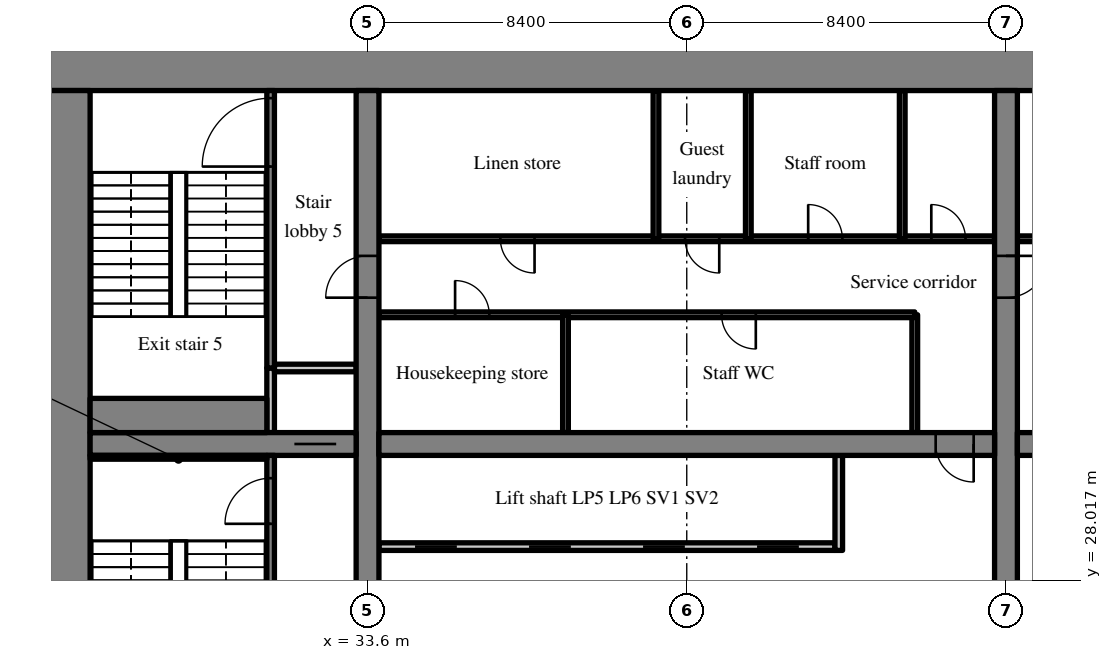
"""IFC4 building model, lengths in metres.
Left out: names, types, materials, properties, quantities, classifications, styles, units other than length and angle.
Written with IfcOpenShell. Run it as: python <this file> out.ifc"""

import sys

from ifc_helpers import new_model, si_unit, direction, frame, frame_2d, origin, place, context, subcontext, project, spatial, rectangle, extrude, source, transform, mapped, element, fill, save


model = new_model("IFC4")
c1 = context("Model", 3, precision=1e-05, world=origin(), true_north=direction((0.0, 1.0)))
c2 = subcontext(c1, "Body", "Model", "MODEL_VIEW")
j1 = project(units=[si_unit("LENGTHUNIT", "METRE"), si_unit("PLANEANGLEUNIT", "RADIAN")], contexts=[c1])
p1 = place(None, origin())
s1 = spatial("IfcSite", under=j1, at=p1, CompositionType="ELEMENT")
p2 = place(p1, origin())
s2 = spatial("IfcBuilding", under=s1, at=p2, CompositionType="ELEMENT")
p3 = place(p2, frame((0.0, 0.0, 6.0)))
s3 = spatial("IfcBuildingStorey", under=s2, at=p3, CompositionType="ELEMENT", Elevation=6.0)
m1 = source(origin(), c2, "Body", "SweptSolid", [
    extrude(rectangle(XDim=50.4, YDim=1.1, at=frame_2d((25.2, 0.0))), origin(), (0.0, 0.0, 1.0), 5.12),
])
p4 = place(p3, frame((25.2, 41.45, 0.0), z_axis=(0.0, 0.0, 1.0), x_axis=(1.0, 0.0, 0.0)))
e1 = element("IfcWall", 1, at=p4, inside=s3, PredefinedType="SHEAR", context=c2, shape_type="MappedRepresentation", body=[
    mapped(m1, transform((0.0, 0.0, 0.0), scale=1.0)),
])
m2 = source(origin(), c2, "Body", "SweptSolid", [
    extrude(rectangle(XDim=17.8, YDim=1.1, at=frame_2d((8.9, 0.0))), origin(), (0.0, 0.0, 1.0), 5.12),
])
p5 = place(p3, frame((25.75, 23.1, 0.0), z_axis=(0.0, 0.0, 1.0), x_axis=(0.0, 1.0, 0.0)))
e2 = element("IfcWall", 2, at=p5, inside=s3, PredefinedType="SHEAR", context=c2, shape_type="MappedRepresentation", body=[
    mapped(m2, transform((0.0, 0.0, 0.0), scale=1.0)),
])
m3 = source(origin(), c2, "Body", "SweptSolid", [
    extrude(rectangle(XDim=17.8, YDim=0.6, at=frame_2d((8.9, 0.0))), origin(), (0.0, 0.0, 1.0), 5.12),
])
p6 = place(p3, frame((33.6, 23.1, 0.0), z_axis=(0.0, 0.0, 1.0), x_axis=(0.0, 1.0, 0.0)))
e3 = element("IfcWall", 3, at=p6, inside=s3, PredefinedType="SHEAR", context=c2, shape_type="MappedRepresentation", body=[
    mapped(m3, transform((0.0, 0.0, 0.0), scale=1.0)),
])
m4 = source(origin(), c2, "Body", "SweptSolid", [
    extrude(rectangle(XDim=1.1, YDim=2.1, at=frame_2d((0.55, 1.05))), frame((0.0, 0.31, 0.0), z_axis=(0.0, -1.0, 0.0), x_axis=(1.0, 0.0, 0.0)), (0.0, 0.0, 1.0), 0.62),
])
p7 = place(p6, frame((12.35, 0.0, 0.0)))
e4 = element("IfcOpeningElement", 4, at=p7, cuts=e3, PredefinedType="OPENING", context=c2, shape_type="MappedRepresentation", body=[
    mapped(m4, transform((0.0, 0.0, 0.0), scale=1.0)),
])
p8 = place(p3, frame((50.4, 23.1, 0.0), z_axis=(0.0, 0.0, 1.0), x_axis=(0.0, 1.0, 0.0)))
e5 = element("IfcWall", 5, at=p8, inside=s3, PredefinedType="SHEAR", context=c2, shape_type="MappedRepresentation", body=[
    mapped(m3, transform((0.0, 0.0, 0.0), scale=1.0)),
])
p9 = place(p8, frame((12.35, 0.0, 0.0)))
e6 = element("IfcOpeningElement", 6, at=p9, cuts=e5, PredefinedType="OPENING", context=c2, shape_type="MappedRepresentation", body=[
    mapped(m4, transform((0.0, 0.0, 0.0), scale=1.0)),
])
m5 = source(origin(), c2, "Body", "SweptSolid", [
    extrude(rectangle(XDim=7.0, YDim=0.6, at=frame_2d((3.5, 0.0))), origin(), (0.0, 0.0, 1.0), 5.12),
])
p10 = place(p3, frame((26.3, 31.6, 0.0), z_axis=(0.0, 0.0, 1.0), x_axis=(1.0, 0.0, 0.0)))
e7 = element("IfcWall", 7, at=p10, inside=s3, PredefinedType="SHEAR", context=c2, shape_type="MappedRepresentation", body=[
    mapped(m5, transform((0.0, 0.0, 0.0), scale=1.0)),
])
p11 = place(p10, frame((5.375, 0.0, 0.0)))
e8 = element("IfcOpeningElement", 8, at=p11, cuts=e7, PredefinedType="OPENING", context=c2, shape_type="MappedRepresentation", body=[
    mapped(m4, transform((0.0, 0.0, 0.0), scale=1.0)),
])
m6 = source(origin(), c2, "Body", "SweptSolid", [
    extrude(rectangle(XDim=16.2, YDim=0.6, at=frame_2d((8.1, 0.0))), origin(), (0.0, 0.0, 1.0), 5.12),
])
p12 = place(p3, frame((33.9, 31.6, 0.0), z_axis=(0.0, 0.0, 1.0), x_axis=(1.0, 0.0, 0.0)))
e9 = element("IfcWall", 9, at=p12, inside=s3, PredefinedType="SHEAR", context=c2, shape_type="MappedRepresentation", body=[
    mapped(m6, transform((0.0, 0.0, 0.0), scale=1.0)),
])
m7 = source(origin(), c2, "Body", "SweptSolid", [
    extrude(rectangle(XDim=1.0, YDim=2.1, at=frame_2d((0.5, 1.05))), frame((0.0, 0.31, 0.0), z_axis=(0.0, -1.0, 0.0), x_axis=(1.0, 0.0, 0.0)), (0.0, 0.0, 1.0), 0.62),
])
p13 = place(p12, frame((14.65, 0.0, 0.0)))
e10 = element("IfcOpeningElement", 10, at=p13, cuts=e9, PredefinedType="OPENING", context=c2, shape_type="MappedRepresentation", body=[
    mapped(m7, transform((0.0, 0.0, 0.0), scale=1.0)),
])
m8 = source(origin(), c2, "Body", "SweptSolid", [
    extrude(rectangle(XDim=16.2, YDim=0.6, at=frame_2d((8.1, 0.0))), origin(), (0.0, 0.0, 1.0), 5.12),
])
p14 = place(p3, frame((50.7, 31.6, 0.0), z_axis=(0.0, 0.0, 1.0), x_axis=(1.0, 0.0, 0.0)))
e11 = element("IfcWall", 11, at=p14, inside=s3, PredefinedType="SHEAR", context=c2, shape_type="MappedRepresentation", body=[
    mapped(m8, transform((0.0, 0.0, 0.0), scale=1.0)),
])
p15 = place(p14, frame((0.55, 0.0, 0.0)))
e12 = element("IfcOpeningElement", 12, at=p15, cuts=e11, PredefinedType="OPENING", context=c2, shape_type="MappedRepresentation", body=[
    mapped(m7, transform((0.0, 0.0, 0.0), scale=1.0)),
])
m9 = source(origin(), c2, "Body", "SweptSolid", [
    extrude(rectangle(XDim=12.0, YDim=0.2, at=frame_2d((6.0, 0.0))), origin(), (0.0, 0.0, 1.0), 5.12),
])
p16 = place(p3, frame((33.9, 28.9, 0.0), z_axis=(0.0, 0.0, 1.0), x_axis=(1.0, 0.0, 0.0)))
e13 = element("IfcWall", 13, at=p16, inside=s3, PredefinedType="SOLIDWALL", context=c2, shape_type="MappedRepresentation", body=[
    mapped(m9, transform((0.0, 0.0, 0.0), scale=1.0)),
])
m10 = source(origin(), c2, "Body", "SweptSolid", [
    extrude(rectangle(XDim=1.1, YDim=2.1, at=frame_2d((0.55, 1.05))), frame((0.0, 0.11, 0.0), z_axis=(0.0, -1.0, 0.0), x_axis=(1.0, 0.0, 0.0)), (0.0, 0.0, 1.0), 0.22),
])
p17 = place(p16, frame((0.95, 0.0, 0.0)))
e14 = element("IfcOpeningElement", 14, at=p17, cuts=e13, PredefinedType="OPENING", context=c2, shape_type="MappedRepresentation", body=[
    mapped(m10, transform((0.0, 0.0, 0.0), scale=1.0)),
])
p18 = place(p16, frame((3.95, 0.0, 0.0)))
e15 = element("IfcOpeningElement", 15, at=p18, cuts=e13, PredefinedType="OPENING", context=c2, shape_type="MappedRepresentation", body=[
    mapped(m10, transform((0.0, 0.0, 0.0), scale=1.0)),
])
p19 = place(p16, frame((6.95, 0.0, 0.0)))
e16 = element("IfcOpeningElement", 16, at=p19, cuts=e13, PredefinedType="OPENING", context=c2, shape_type="MappedRepresentation", body=[
    mapped(m10, transform((0.0, 0.0, 0.0), scale=1.0)),
])
p20 = place(p16, frame((9.95, 0.0, 0.0)))
e17 = element("IfcOpeningElement", 17, at=p20, cuts=e13, PredefinedType="OPENING", context=c2, shape_type="MappedRepresentation", body=[
    mapped(m10, transform((0.0, 0.0, 0.0), scale=1.0)),
])
m11 = source(origin(), c2, "Body", "SweptSolid", [
    extrude(rectangle(XDim=2.5, YDim=0.2, at=frame_2d((1.25, 0.0))), origin(), (0.0, 0.0, 1.0), 5.12),
])
p21 = place(p3, frame((46.0, 28.8, 0.0), z_axis=(0.0, 0.0, 1.0), x_axis=(0.0, 1.0, 0.0)))
e18 = element("IfcWall", 18, at=p21, inside=s3, PredefinedType="SOLIDWALL", context=c2, shape_type="MappedRepresentation", body=[
    mapped(m11, transform((0.0, 0.0, 0.0), scale=1.0)),
])
m12 = source(origin(), c2, "Body", "SweptSolid", [
    extrude(rectangle(XDim=3.1, YDim=0.15, at=frame_2d((1.55, 0.0))), origin(), (0.0, 0.0, 1.0), 5.12),
])
p22 = place(p3, frame((48.0, 31.9, 0.0), z_axis=(0.0, 0.0, 1.0), x_axis=(0.0, 1.0, 0.0)))
e19 = element("IfcWall", 19, at=p22, inside=s3, PredefinedType="PARTITIONING", context=c2, shape_type="MappedRepresentation", body=[
    mapped(m12, transform((0.0, 0.0, 0.0), scale=1.0)),
])
m13 = source(origin(), c2, "Body", "SweptSolid", [
    extrude(rectangle(XDim=14.1, YDim=0.15, at=frame_2d((7.05, 0.0))), origin(), (0.0, 0.0, 1.0), 5.12),
])
p23 = place(p3, frame((33.9, 35.0, 0.0), z_axis=(0.0, 0.0, 1.0), x_axis=(1.0, 0.0, 0.0)))
e20 = element("IfcWall", 20, at=p23, inside=s3, PredefinedType="PARTITIONING", context=c2, shape_type="MappedRepresentation", body=[
    mapped(m13, transform((0.0, 0.0, 0.0), scale=1.0)),
])
m14 = source(origin(), c2, "Body", "SweptSolid", [
    extrude(rectangle(XDim=0.9, YDim=2.1, at=frame_2d((0.45, 1.05))), frame((0.0, 0.085, 0.0), z_axis=(0.0, -1.0, 0.0), x_axis=(1.0, 0.0, 0.0)), (0.0, 0.0, 1.0), 0.17),
])
p24 = place(p23, frame((2.004, 0.0, 0.0)))
e21 = element("IfcOpeningElement", 21, at=p24, cuts=e20, PredefinedType="OPENING", context=c2, shape_type="MappedRepresentation", body=[
    mapped(m14, transform((0.0, 0.0, 0.0), scale=1.0)),
])
p25 = place(p23, frame((9.017, 0.0, 0.0)))
e22 = element("IfcOpeningElement", 22, at=p25, cuts=e20, PredefinedType="OPENING", context=c2, shape_type="MappedRepresentation", body=[
    mapped(m14, transform((0.0, 0.0, 0.0), scale=1.0)),
])
m15 = source(origin(), c2, "Body", "SweptSolid", [
    extrude(rectangle(XDim=16.2, YDim=0.15, at=frame_2d((8.1, 0.0))), origin(), (0.0, 0.0, 1.0), 5.12),
])
p26 = place(p3, frame((33.9, 37.0, 0.0), z_axis=(0.0, 0.0, 1.0), x_axis=(1.0, 0.0, 0.0)))
e23 = element("IfcWall", 23, at=p26, inside=s3, PredefinedType="PARTITIONING", context=c2, shape_type="MappedRepresentation", body=[
    mapped(m15, transform((0.0, 0.0, 0.0), scale=1.0)),
])
p27 = place(p26, frame((3.195, 0.0, 0.0)))
e24 = element("IfcOpeningElement", 24, at=p27, cuts=e23, PredefinedType="OPENING", context=c2, shape_type="MappedRepresentation", body=[
    mapped(m14, transform((0.0, 0.0, 0.0), scale=1.0)),
])
p28 = place(p26, frame((8.055, 0.0, 0.0)))
e25 = element("IfcOpeningElement", 25, at=p28, cuts=e23, PredefinedType="OPENING", context=c2, shape_type="MappedRepresentation", body=[
    mapped(m14, transform((0.0, 0.0, 0.0), scale=1.0)),
])
p29 = place(p26, frame((11.295, 0.0, 0.0)))
e26 = element("IfcOpeningElement", 26, at=p29, cuts=e23, PredefinedType="OPENING", context=c2, shape_type="MappedRepresentation", body=[
    mapped(m14, transform((0.0, 0.0, 0.0), scale=1.0)),
])
p30 = place(p26, frame((14.535, 0.0, 0.0)))
e27 = element("IfcOpeningElement", 27, at=p30, cuts=e23, PredefinedType="OPENING", context=c2, shape_type="MappedRepresentation", body=[
    mapped(m14, transform((0.0, 0.0, 0.0), scale=1.0)),
])
p31 = place(p3, frame((38.809, 31.9, 0.0), z_axis=(0.0, 0.0, 1.0), x_axis=(0.0, 1.0, 0.0)))
e28 = element("IfcWall", 28, at=p31, inside=s3, PredefinedType="PARTITIONING", context=c2, shape_type="MappedRepresentation", body=[
    mapped(m12, transform((0.0, 0.0, 0.0), scale=1.0)),
])
m16 = source(origin(), c2, "Body", "SweptSolid", [
    extrude(rectangle(XDim=3.9, YDim=0.15, at=frame_2d((1.95, 0.0))), origin(), (0.0, 0.0, 1.0), 5.12),
])
for number, where, z_axis, x_axis in (
    (29, (41.19, 37.0, 0.0), (0.0, 0.0, 1.0), (0.0, 1.0, 0.0)),
    (30, (43.62, 37.0, 0.0), (0.0, 0.0, 1.0), (0.0, 1.0, 0.0)),
    (31, (47.67, 37.0, 0.0), (0.0, 0.0, 1.0), (0.0, 1.0, 0.0)),
):
    element("IfcWall", number, at=place(p3, frame(where, z_axis=z_axis, x_axis=x_axis)), inside=s3, PredefinedType="PARTITIONING", context=c2, shape_type="MappedRepresentation", body=[
        mapped(m16, transform((0.0, 0.0, 0.0), scale=1.0)),
    ])
m17 = source(origin(), c2, "Body", "SweptSolid", [
    extrude(rectangle(XDim=16.2, YDim=0.15, at=frame_2d((8.1, 0.0))), origin(), (0.0, 0.0, 1.0), 5.12),
])
p32 = place(p3, frame((66.9, 37.0, 0.0), z_axis=(0.0, 0.0, 1.0), x_axis=(-1.0, 0.0, 0.0)))
e32 = element("IfcWall", 32, at=p32, inside=s3, PredefinedType="PARTITIONING", context=c2, shape_type="MappedRepresentation", body=[
    mapped(m17, transform((0.0, 0.0, 0.0), scale=1.0)),
])
p33 = place(p32, frame((0.765, 0.0, 0.0)))
e33 = element("IfcOpeningElement", 33, at=p33, cuts=e32, PredefinedType="OPENING", context=c2, shape_type="MappedRepresentation", body=[
    mapped(m14, transform((0.0, 0.0, 0.0), scale=1.0)),
])
p34 = place(p32, frame((3.6, 0.0, 0.0)))
e34 = element("IfcOpeningElement", 34, at=p34, cuts=e32, PredefinedType="OPENING", context=c2, shape_type="MappedRepresentation", body=[
    mapped(m14, transform((0.0, 0.0, 0.0), scale=1.0)),
])
p35 = place(p32, frame((9.27, 0.0, 0.0)))
e35 = element("IfcOpeningElement", 35, at=p35, cuts=e32, PredefinedType="OPENING", context=c2, shape_type="MappedRepresentation", body=[
    mapped(m14, transform((0.0, 0.0, 0.0), scale=1.0)),
])
p36 = place(p32, frame((14.535, 0.0, 0.0)))
e36 = element("IfcOpeningElement", 36, at=p36, cuts=e32, PredefinedType="OPENING", context=c2, shape_type="MappedRepresentation", body=[
    mapped(m14, transform((0.0, 0.0, 0.0), scale=1.0)),
])
m18 = source(origin(), c2, "Body", "SweptSolid", [
    extrude(rectangle(XDim=8.2, YDim=0.2, at=frame_2d((4.1, 0.0))), origin(), (0.0, 0.0, 1.0), 5.12),
])
p37 = place(p3, frame((31.05, 23.1, 0.0), z_axis=(0.0, 0.0, 1.0), x_axis=(0.0, 1.0, 0.0)))
e37 = element("IfcWall", 37, at=p37, inside=s3, PredefinedType="SOLIDWALL", context=c2, shape_type="MappedRepresentation", body=[
    mapped(m18, transform((0.0, 0.0, 0.0), scale=1.0)),
])
m19 = source(origin(), c2, "Body", "SweptSolid", [
    extrude(rectangle(XDim=1.2, YDim=2.1, at=frame_2d((0.6, 1.05))), frame((0.0, 0.11, 0.0), z_axis=(0.0, -1.0, 0.0), x_axis=(1.0, 0.0, 0.0)), (0.0, 0.0, 1.0), 0.22),
])
p38 = place(p37, frame((6.4, 0.0, 0.0)))
e38 = element("IfcOpeningElement", 38, at=p38, cuts=e37, PredefinedType="OPENING", context=c2, shape_type="MappedRepresentation", body=[
    mapped(m19, transform((0.0, 0.0, 0.0), scale=1.0)),
])
m20 = source(origin(), c2, "Body", "SweptSolid", [
    extrude(rectangle(XDim=1.7, YDim=0.2, at=frame_2d((0.85, 0.0))), origin(), (0.0, 0.0, 1.0), 5.12),
])
p39 = place(p3, frame((31.05, 31.9, 0.0), z_axis=(0.0, 0.0, 1.0), x_axis=(0.0, 1.0, 0.0)))
e39 = element("IfcWall", 39, at=p39, inside=s3, PredefinedType="SOLIDWALL", context=c2, shape_type="MappedRepresentation", body=[
    mapped(m20, transform((0.0, 0.0, 0.0), scale=1.0)),
])
m21 = source(origin(), c2, "Body", "SweptSolid", [
    extrude(rectangle(XDim=2.15, YDim=0.2, at=frame_2d((1.075, 0.0))), origin(), (0.0, 0.0, 1.0), 5.12),
])
p40 = place(p3, frame((31.15, 33.6, 0.0), z_axis=(0.0, 0.0, 1.0), x_axis=(1.0, 0.0, 0.0)))
e40 = element("IfcWall", 40, at=p40, inside=s3, PredefinedType="SOLIDWALL", context=c2, shape_type="MappedRepresentation", body=[
    mapped(m21, transform((0.0, 0.0, 0.0), scale=1.0)),
])
m22 = source(origin(), c2, "Body", "SweptSolid", [
    extrude(rectangle(XDim=7.3, YDim=0.2, at=frame_2d((3.65, 0.0))), origin(), (0.0, 0.0, 1.0), 5.12),
])
p41 = place(p3, frame((31.05, 33.6, 0.0), z_axis=(0.0, 0.0, 1.0), x_axis=(0.0, 1.0, 0.0)))
e41 = element("IfcWall", 41, at=p41, inside=s3, PredefinedType="SOLIDWALL", context=c2, shape_type="MappedRepresentation", body=[
    mapped(m22, transform((0.0, 0.0, 0.0), scale=1.0)),
])
m23 = source(origin(), c2, "Body", "SweptSolid", [
    extrude(rectangle(XDim=1.8, YDim=2.1, at=frame_2d((0.9, 1.05))), frame((0.0, 0.11, 0.0), z_axis=(0.0, -1.0, 0.0), x_axis=(1.0, 0.0, 0.0)), (0.0, 0.0, 1.0), 0.22),
])
p42 = place(p41, frame((5.3, 0.0, 0.0)))
e42 = element("IfcOpeningElement", 42, at=p42, cuts=e41, PredefinedType="OPENING", context=c2, shape_type="MappedRepresentation", body=[
    mapped(m23, transform((0.0, 0.0, 0.0), scale=1.0)),
])
m24 = source(origin(), c2, "Body", "SweptSolid", [
    extrude(rectangle(XDim=4.65, YDim=0.1, at=frame_2d((2.325, 0.0))), origin(), (0.0, 0.0, 1.0), 5.12),
])
p43 = place(p3, frame((26.3, 31.25, 0.0), z_axis=(0.0, 0.0, 1.0), x_axis=(1.0, 0.0, 0.0)))
e43 = element("IfcWall", 43, at=p43, inside=s3, PredefinedType="SOLIDWALL", context=c2, shape_type="MappedRepresentation", body=[
    mapped(m24, transform((0.0, 0.0, 0.0), scale=1.0)),
])
m25 = source(origin(), c2, "Body", "SweptSolid", [
    extrude(rectangle(XDim=4.65, YDim=0.9, at=frame_2d((2.325, 0.0))), origin(), (0.0, 0.0, 1.0), 5.12),
])
p44 = place(p3, frame((26.3, 32.35, 0.0), z_axis=(0.0, 0.0, 1.0), x_axis=(1.0, 0.0, 0.0)))
e44 = element("IfcWall", 44, at=p44, inside=s3, PredefinedType="SOLIDWALL", context=c2, shape_type="MappedRepresentation", body=[
    mapped(m25, transform((0.0, 0.0, 0.0), scale=1.0)),
])
m26 = source(origin(), c2, "Body", "SweptSolid", [
    extrude(rectangle(XDim=1.0, YDim=2.1, at=frame_2d((0.5, 1.05))), frame((0.0, 0.025, 0.0), z_axis=(0.0, -1.0, 0.0), x_axis=(1.0, 0.0, 0.0)), (0.0, 0.0, 1.0), 0.05),
])
p45 = place(p13, origin())
e45 = element("IfcDoor", 45, at=p45, inside=s3, OperationType="SINGLE_SWING_RIGHT", PredefinedType="DOOR", context=c2, shape_type="MappedRepresentation", body=[
    mapped(m26, transform((0.0, 0.0, 0.0), scale=1.0)),
])
fill(e10, e45)
m27 = source(origin(), c2, "Body", "SweptSolid", [
    extrude(rectangle(XDim=1.1, YDim=2.1, at=frame_2d((0.55, 1.05))), frame((0.0, 0.025, 0.0), z_axis=(0.0, -1.0, 0.0), x_axis=(1.0, 0.0, 0.0)), (0.0, 0.0, 1.0), 0.05),
])
p46 = place(p17, origin())
e46 = element("IfcDoor", 46, at=p46, inside=s3, OperationType="SLIDING_TO_LEFT", PredefinedType="DOOR", context=c2, shape_type="MappedRepresentation", body=[
    mapped(m27, transform((0.0, 0.0, 0.0), scale=1.0)),
])
fill(e14, e46)
p47 = place(p18, origin())
e47 = element("IfcDoor", 47, at=p47, inside=s3, OperationType="SLIDING_TO_RIGHT", PredefinedType="DOOR", context=c2, shape_type="MappedRepresentation", body=[
    mapped(m27, transform((0.0, 0.0, 0.0), scale=1.0)),
])
fill(e15, e47)
p48 = place(p19, origin())
e48 = element("IfcDoor", 48, at=p48, inside=s3, OperationType="SLIDING_TO_LEFT", PredefinedType="DOOR", context=c2, shape_type="MappedRepresentation", body=[
    mapped(m27, transform((0.0, 0.0, 0.0), scale=1.0)),
])
fill(e16, e48)
p49 = place(p20, origin())
e49 = element("IfcDoor", 49, at=p49, inside=s3, OperationType="SLIDING_TO_RIGHT", PredefinedType="DOOR", context=c2, shape_type="MappedRepresentation", body=[
    mapped(m27, transform((0.0, 0.0, 0.0), scale=1.0)),
])
fill(e17, e49)
m28 = source(origin(), c2, "Body", "SweptSolid", [
    extrude(rectangle(XDim=0.9, YDim=2.1, at=frame_2d((0.45, 1.05))), frame((0.0, 0.025, 0.0), z_axis=(0.0, -1.0, 0.0), x_axis=(1.0, 0.0, 0.0)), (0.0, 0.0, 1.0), 0.05),
])
p50 = place(p24, origin())
e50 = element("IfcDoor", 50, at=p50, inside=s3, OperationType="SINGLE_SWING_LEFT", PredefinedType="DOOR", context=c2, shape_type="MappedRepresentation", body=[
    mapped(m28, transform((0.0, 0.0, 0.0), scale=1.0)),
])
fill(e21, e50)
p51 = place(p25, origin())
e51 = element("IfcDoor", 51, at=p51, inside=s3, OperationType="SINGLE_SWING_RIGHT", PredefinedType="DOOR", context=c2, shape_type="MappedRepresentation", body=[
    mapped(m28, transform((0.0, 0.0, 0.0), scale=1.0)),
])
fill(e22, e51)
p52 = place(p27, origin())
e52 = element("IfcDoor", 52, at=p52, inside=s3, OperationType="SINGLE_SWING_RIGHT", PredefinedType="DOOR", context=c2, shape_type="MappedRepresentation", body=[
    mapped(m28, transform((0.0, 0.0, 0.0), scale=1.0)),
])
fill(e24, e52)
p53 = place(p28, origin())
e53 = element("IfcDoor", 53, at=p53, inside=s3, OperationType="SINGLE_SWING_RIGHT", PredefinedType="DOOR", context=c2, shape_type="MappedRepresentation", body=[
    mapped(m28, transform((0.0, 0.0, 0.0), scale=1.0)),
])
fill(e25, e53)
p54 = place(p29, origin())
e54 = element("IfcDoor", 54, at=p54, inside=s3, OperationType="SINGLE_SWING_LEFT", PredefinedType="DOOR", context=c2, shape_type="MappedRepresentation", body=[
    mapped(m28, transform((0.0, 0.0, 0.0), scale=1.0)),
])
fill(e26, e54)
p55 = place(p30, origin())
e55 = element("IfcDoor", 55, at=p55, inside=s3, OperationType="SINGLE_SWING_LEFT", PredefinedType="DOOR", context=c2, shape_type="MappedRepresentation", body=[
    mapped(m28, transform((0.0, 0.0, 0.0), scale=1.0)),
])
fill(e27, e55)
m29 = source(origin(), c2, "Body", "SweptSolid", [
    extrude(rectangle(XDim=1.2, YDim=2.1, at=frame_2d((0.6, 1.05))), frame((0.0, 0.025, 0.0), z_axis=(0.0, -1.0, 0.0), x_axis=(1.0, 0.0, 0.0)), (0.0, 0.0, 1.0), 0.05),
])
p56 = place(p38, origin())
e56 = element("IfcDoor", 56, at=p56, inside=s3, OperationType="SINGLE_SWING_LEFT", PredefinedType="DOOR", context=c2, shape_type="MappedRepresentation", body=[
    mapped(m29, transform((0.0, 0.0, 0.0), scale=1.0)),
])
fill(e38, e56)
p57 = place(p11, origin())
e57 = element("IfcDoor", 57, at=p57, inside=s3, OperationType="SLIDING_TO_RIGHT", PredefinedType="DOOR", context=c2, shape_type="MappedRepresentation", body=[
    mapped(m27, transform((0.0, 0.0, 0.0), scale=1.0)),
])
fill(e8, e57)
m30 = source(origin(), c2, "Body", "SweptSolid", [
    extrude(rectangle(XDim=1.8, YDim=2.1, at=frame_2d((0.9, 1.05))), frame((0.0, 0.025, 0.0), z_axis=(0.0, -1.0, 0.0), x_axis=(1.0, 0.0, 0.0)), (0.0, 0.0, 1.0), 0.05),
])
p58 = place(p42, origin())
e58 = element("IfcDoor", 58, at=p58, inside=s3, OperationType="SINGLE_SWING_LEFT", PredefinedType="DOOR", context=c2, shape_type="MappedRepresentation", body=[
    mapped(m30, transform((0.0, 0.0, 0.0), scale=1.0)),
])
fill(e42, e58)
p59 = place(p7, origin())
e59 = element("IfcDoor", 59, at=p59, inside=s3, OperationType="SINGLE_SWING_LEFT", PredefinedType="DOOR", context=c2, shape_type="MappedRepresentation", body=[
    mapped(m27, transform((0.0, 0.0, 0.0), scale=1.0)),
])
fill(e4, e59)
p60 = place(p9, origin())
e60 = element("IfcDoor", 60, at=p60, inside=s3, OperationType="SINGLE_SWING_RIGHT", PredefinedType="DOOR", context=c2, shape_type="MappedRepresentation", body=[
    mapped(m27, transform((0.0, 0.0, 0.0), scale=1.0)),
])
fill(e6, e60)
save(model, sys.argv[1])
